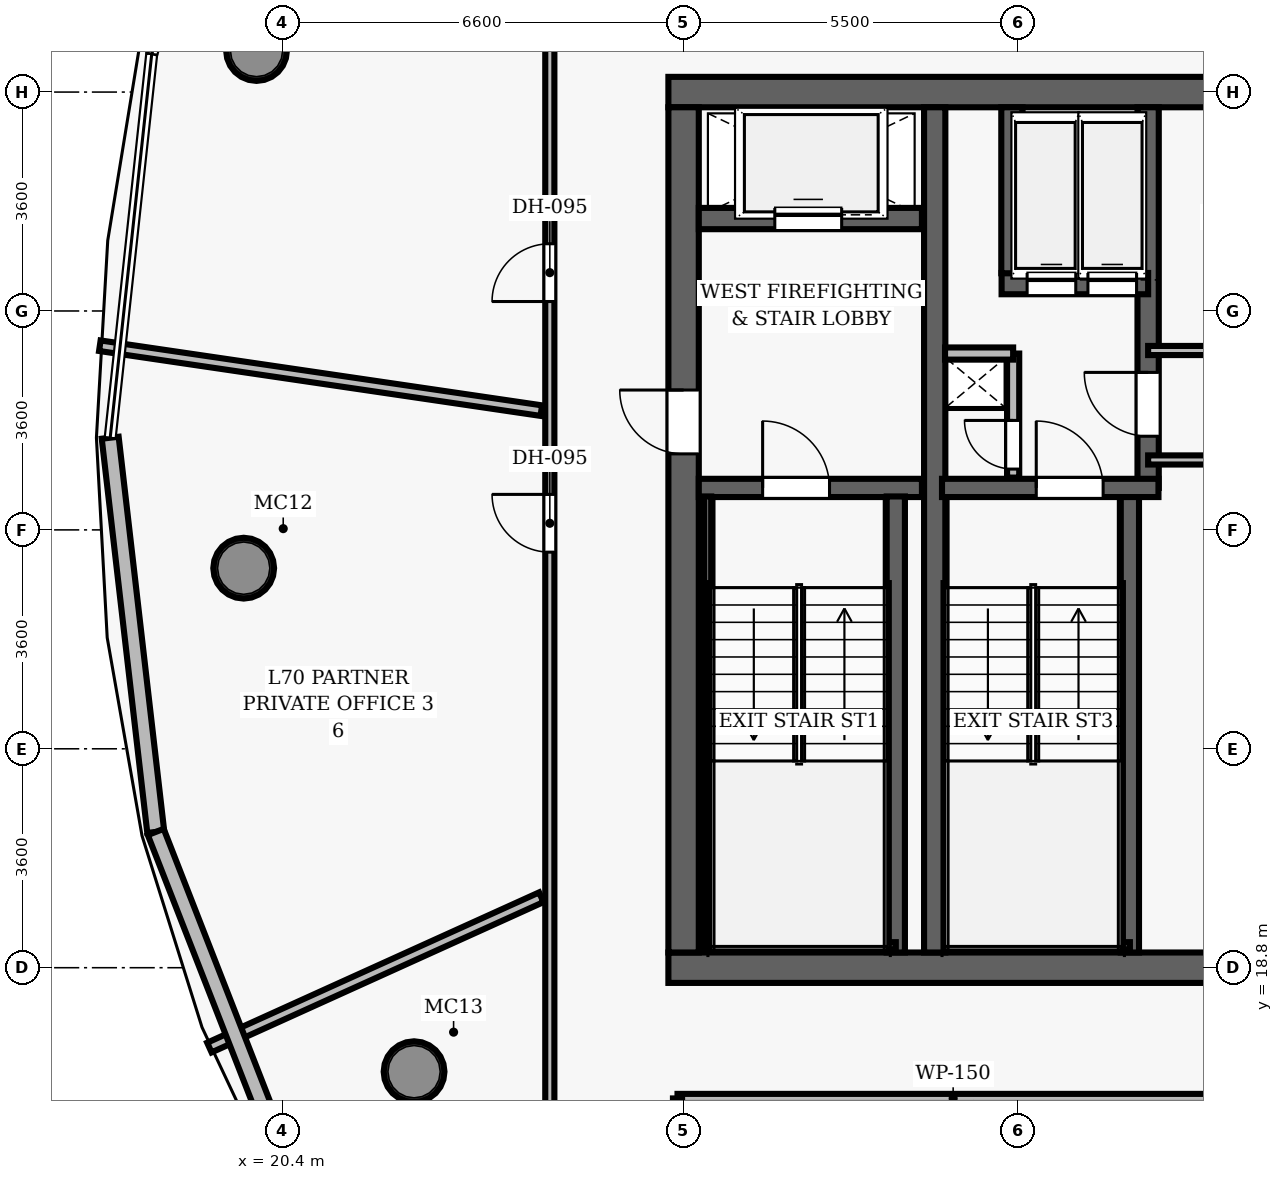
"""IFC4 building model, lengths in metres.
Left out: names, types, materials, properties, quantities, classifications, styles, units other than length and angle.
Written with IfcOpenShell. Run it as: python <this file> out.ifc"""

import sys

from ifc_helpers import new_model, si_unit, direction, frame, frame_2d, origin, origin_2d, place, context, subcontext, project, spatial, rectangle, hollow_circle, extrude, element, fill, save


model = new_model("IFC4")
c1 = context("Model", 3, precision=1e-05, world=origin(), true_north=direction((0.0, 1.0)))
c2 = subcontext(c1, "Body", "Model", "MODEL_VIEW")
j1 = project(units=[si_unit("LENGTHUNIT", "METRE"), si_unit("PLANEANGLEUNIT", "RADIAN")], contexts=[c1])
p1 = place(None, origin())
s1 = spatial("IfcSite", under=j1, at=p1, CompositionType="ELEMENT")
p2 = place(p1, origin())
s2 = spatial("IfcBuilding", under=s1, at=p2, CompositionType="ELEMENT")
p3 = place(p2, frame((0.0, 0.0, 276.7)))
s3 = spatial("IfcBuildingStorey", under=s2, at=p3, CompositionType="ELEMENT", Elevation=276.7)
p4 = place(p3, frame((26.75, 18.8, 0.0), z_axis=(0.0, 0.0, 1.0), x_axis=(1.0, 0.0, 0.0)))
e1 = element("IfcWall", 1, at=p4, inside=s3, PredefinedType="SHEAR", context=c2, shape_type="SweptSolid", body=[
    extrude(rectangle(XDim=22.5, YDim=0.5, at=frame_2d((11.25, 0.0))), origin(), (0.0, 0.0, 1.0), 3.85),
])
p5 = place(p4, frame((14.47, 0.0, 0.0)))
e2 = element("IfcOpeningElement", 2, at=p5, cuts=e1, PredefinedType="OPENING", context=c2, shape_type="SweptSolid", body=[
    extrude(rectangle(XDim=1.05, YDim=2.15, at=frame_2d((0.525, 1.075))), frame((0.0, 0.26, 0.0), z_axis=(0.0, -1.0, 0.0), x_axis=(1.0, 0.0, 0.0)), (0.0, 0.0, 1.0), 0.52),
])
p6 = place(p3, frame((26.75, 33.2, 0.0), z_axis=(0.0, 0.0, 1.0), x_axis=(1.0, 0.0, 0.0)))
e3 = element("IfcWall", 3, at=p6, inside=s3, PredefinedType="SHEAR", context=c2, shape_type="SweptSolid", body=[
    extrude(rectangle(XDim=22.5, YDim=0.5, at=frame_2d((11.25, 0.0))), origin(), (0.0, 0.0, 1.0), 3.85),
])
p7 = place(p3, frame((27.0, 19.05, 0.0), z_axis=(0.0, 0.0, 1.0), x_axis=(0.0, 1.0, 0.0)))
e4 = element("IfcWall", 4, at=p7, inside=s3, PredefinedType="SHEAR", context=c2, shape_type="SweptSolid", body=[
    extrude(rectangle(XDim=13.9, YDim=0.5, at=frame_2d((6.95, 0.0))), origin(), (0.0, 0.0, 1.0), 3.85),
])
p8 = place(p7, frame((8.2, 0.0, 0.0)))
e5 = element("IfcOpeningElement", 5, at=p8, cuts=e4, PredefinedType="OPENING", context=c2, shape_type="SweptSolid", body=[
    extrude(rectangle(XDim=1.05, YDim=2.15, at=frame_2d((0.525, 1.075))), frame((0.0, 0.26, 0.0), z_axis=(0.0, -1.0, 0.0), x_axis=(1.0, 0.0, 0.0)), (0.0, 0.0, 1.0), 0.52),
])
p9 = place(p3, frame((31.13, 19.05, 0.0), z_axis=(0.0, 0.0, 1.0), x_axis=(0.0, 1.0, 0.0)))
e6 = element("IfcWall", 6, at=p9, inside=s3, PredefinedType="SHEAR", context=c2, shape_type="SweptSolid", body=[
    extrude(rectangle(XDim=13.9, YDim=0.35, at=frame_2d((6.95, 0.0))), origin(), (0.0, 0.0, 1.0), 3.85),
])
for number, where, z_axis, x_axis in (
    (7, (19.976, 33.884, 0.0), (0.0, 0.0, 1.0), (1.0, 0.0, 0.0)),
    (8, (19.765, 25.371, 0.0), (0.0, 0.0, 1.0), (1.0, 0.0, 0.0)),
    (9, (22.567, 17.09, 0.0), (0.0, 0.0, 1.0), (1.0, 0.0, 0.0)),
):
    element("IfcColumn", number, at=place(p3, frame(where, z_axis=z_axis, x_axis=x_axis)), inside=s3, PredefinedType="COLUMN", context=c2, shape_type="SweptSolid", body=[
        extrude(hollow_circle(Radius=0.5, WallThickness=0.045, at=origin_2d()), origin(), (0.0, 0.0, 1.0), 3.85),
    ])
p10 = place(p3, frame((27.25, 26.69, 0.0), z_axis=(0.0, 0.0, 1.0), x_axis=(1.0, 0.0, 0.0)))
e10 = element("IfcWall", 10, at=p10, inside=s3, PredefinedType="SHEAR", context=c2, shape_type="SweptSolid", body=[
    extrude(rectangle(XDim=3.67, YDim=0.3, at=frame_2d((1.835, 0.0))), origin(), (0.0, 0.0, 1.0), 3.85),
])
p11 = place(p10, frame((1.05, 0.0, 0.0)))
e11 = element("IfcOpeningElement", 11, at=p11, cuts=e10, PredefinedType="OPENING", context=c2, shape_type="SweptSolid", body=[
    extrude(rectangle(XDim=1.1, YDim=2.15, at=frame_2d((0.55, 1.075))), frame((0.0, 0.16, 0.0), z_axis=(0.0, -1.0, 0.0), x_axis=(1.0, 0.0, 0.0)), (0.0, 0.0, 1.0), 0.32),
])
p12 = place(p3, frame((30.49, 19.05, 0.0), z_axis=(0.0, 0.0, 1.0), x_axis=(0.0, 1.0, 0.0)))
e12 = element("IfcWall", 12, at=p12, inside=s3, PredefinedType="SHEAR", context=c2, shape_type="SweptSolid", body=[
    extrude(rectangle(XDim=7.5, YDim=0.3, at=frame_2d((3.75, 0.0))), origin(), (0.0, 0.0, 1.0), 3.85),
])
p13 = place(p3, frame((27.395, 19.1, 0.0), z_axis=(0.0, 0.0, 1.0), x_axis=(0.0, 1.0, 0.0)))
e13 = element("IfcWall", 13, at=p13, inside=s3, PredefinedType="SHEAR", context=c2, shape_type="SweptSolid", body=[
    extrude(rectangle(XDim=7.45, YDim=0.12, at=frame_2d((3.725, 0.0))), origin(), (0.0, 0.0, 1.0), 3.85),
])
p14 = place(p3, frame((27.395, 19.16, 0.0), z_axis=(0.0, 0.0, 1.0), x_axis=(1.0, 0.0, 0.0)))
e14 = element("IfcWall", 14, at=p14, inside=s3, PredefinedType="SHEAR", context=c2, shape_type="SweptSolid", body=[
    extrude(rectangle(XDim=3.095, YDim=0.12, at=frame_2d((1.547, 0.0))), origin(), (0.0, 0.0, 1.0), 3.85),
])
p15 = place(p3, frame((27.25, 31.12, 0.0), z_axis=(0.0, 0.0, 1.0), x_axis=(1.0, 0.0, 0.0)))
e15 = element("IfcWall", 15, at=p15, inside=s3, PredefinedType="SHEAR", context=c2, shape_type="SweptSolid", body=[
    extrude(rectangle(XDim=3.67, YDim=0.35, at=frame_2d((1.835, 0.0))), origin(), (0.0, 0.0, 1.0), 3.04),
])
p16 = place(p15, frame((1.25, 0.0, 0.0)))
e16 = element("IfcOpeningElement", 16, at=p16, cuts=e15, PredefinedType="OPENING", context=c2, shape_type="SweptSolid", body=[
    extrude(rectangle(XDim=1.1, YDim=2.15, at=frame_2d((0.55, 1.075))), frame((0.0, 0.185, 0.0), z_axis=(0.0, -1.0, 0.0), x_axis=(1.0, 0.0, 0.0)), (0.0, 0.0, 1.0), 0.37),
])
p17 = place(p3, frame((34.34, 19.05, 0.0), z_axis=(0.0, 0.0, 1.0), x_axis=(0.0, 1.0, 0.0)))
e17 = element("IfcWall", 17, at=p17, inside=s3, PredefinedType="SHEAR", context=c2, shape_type="SweptSolid", body=[
    extrude(rectangle(XDim=7.5, YDim=0.3, at=frame_2d((3.75, 0.0))), origin(), (0.0, 0.0, 1.0), 3.85),
])
p18 = place(p3, frame((34.64, 26.69, 0.0), z_axis=(0.0, 0.0, 1.0), x_axis=(0.0, 1.0, 0.0)))
e18 = element("IfcWall", 18, at=p18, inside=s3, PredefinedType="SHEAR", context=c2, shape_type="SweptSolid", body=[
    extrude(rectangle(XDim=6.26, YDim=0.35, at=frame_2d((3.13, 0.0))), origin(), (0.0, 0.0, 1.0), 3.85),
])
p19 = place(p18, frame((0.85, 0.0, 0.0)))
e19 = element("IfcOpeningElement", 19, at=p19, cuts=e18, PredefinedType="OPENING", context=c2, shape_type="SweptSolid", body=[
    extrude(rectangle(XDim=1.05, YDim=2.15, at=frame_2d((0.525, 1.075))), frame((0.0, 0.185, 0.0), z_axis=(0.0, -1.0, 0.0), x_axis=(1.0, 0.0, 0.0)), (0.0, 0.0, 1.0), 0.37),
])
p20 = place(p3, frame((31.25, 26.69, 0.0), z_axis=(0.0, 0.0, 1.0), x_axis=(1.0, 0.0, 0.0)))
e20 = element("IfcWall", 20, at=p20, inside=s3, PredefinedType="SHEAR", context=c2, shape_type="SweptSolid", body=[
    extrude(rectangle(XDim=3.56, YDim=0.3, at=frame_2d((1.78, 0.0))), origin(), (0.0, 0.0, 1.0), 3.85),
])
p21 = place(p20, frame((1.55, 0.0, 0.0)))
e21 = element("IfcOpeningElement", 21, at=p21, cuts=e20, PredefinedType="OPENING", context=c2, shape_type="SweptSolid", body=[
    extrude(rectangle(XDim=1.1, YDim=2.15, at=frame_2d((0.55, 1.075))), frame((0.0, 0.16, 0.0), z_axis=(0.0, -1.0, 0.0), x_axis=(1.0, 0.0, 0.0)), (0.0, 0.0, 1.0), 0.32),
])
p22 = place(p3, frame((31.3, 19.16, 0.0), z_axis=(0.0, 0.0, 1.0), x_axis=(1.0, 0.0, 0.0)))
e22 = element("IfcWall", 22, at=p22, inside=s3, PredefinedType="SHEAR", context=c2, shape_type="SweptSolid", body=[
    extrude(rectangle(XDim=3.04, YDim=0.12, at=frame_2d((1.52, 0.0))), origin(), (0.0, 0.0, 1.0), 3.85),
])
p23 = place(p3, frame((32.23, 30.05, 0.0), z_axis=(0.0, 0.0, 1.0), x_axis=(1.0, 0.0, 0.0)))
e23 = element("IfcWall", 23, at=p23, inside=s3, PredefinedType="SHEAR", context=c2, shape_type="SweptSolid", body=[
    extrude(rectangle(XDim=2.41, YDim=0.35, at=frame_2d((1.205, 0.0))), origin(), (0.0, 0.0, 1.0), 3.04),
])
p24 = place(p23, frame((0.42, 0.0, 0.0)))
e24 = element("IfcOpeningElement", 24, at=p24, cuts=e23, PredefinedType="OPENING", context=c2, shape_type="SweptSolid", body=[
    extrude(rectangle(XDim=0.8, YDim=2.15, at=frame_2d((0.4, 1.075))), frame((0.0, 0.185, 0.0), z_axis=(0.0, -1.0, 0.0), x_axis=(1.0, 0.0, 0.0)), (0.0, 0.0, 1.0), 0.37),
])
p25 = place(p23, frame((1.42, 0.0, 0.0)))
e25 = element("IfcOpeningElement", 25, at=p25, cuts=e23, PredefinedType="OPENING", context=c2, shape_type="SweptSolid", body=[
    extrude(rectangle(XDim=0.8, YDim=2.15, at=frame_2d((0.4, 1.075))), frame((0.0, 0.185, 0.0), z_axis=(0.0, -1.0, 0.0), x_axis=(1.0, 0.0, 0.0)), (0.0, 0.0, 1.0), 0.37),
])
p26 = place(p3, frame((32.4, 30.22, 0.0), z_axis=(0.0, 0.0, 1.0), x_axis=(0.0, 1.0, 0.0)))
e26 = element("IfcWall", 26, at=p26, inside=s3, PredefinedType="SHEAR", context=c2, shape_type="SweptSolid", body=[
    extrude(rectangle(XDim=2.73, YDim=0.35, at=frame_2d((1.365, 0.0))), origin(), (0.0, 0.0, 1.0), 3.04),
])
p27 = place(p3, frame((32.42, 26.86, 0.0), z_axis=(0.0, 0.0, 1.0), x_axis=(0.0, 1.0, 0.0)))
e27 = element("IfcWall", 27, at=p27, inside=s3, PredefinedType="PARTITIONING", context=c2, shape_type="SweptSolid", body=[
    extrude(rectangle(XDim=2.04, YDim=0.2, at=frame_2d((1.02, 0.0))), origin(), (0.0, 0.0, 1.0), 3.04),
])
p28 = place(p27, frame((0.14, 0.0, 0.0)))
e28 = element("IfcOpeningElement", 28, at=p28, cuts=e27, PredefinedType="OPENING", context=c2, shape_type="SweptSolid", body=[
    extrude(rectangle(XDim=0.8, YDim=2.05, at=frame_2d((0.4, 1.025))), frame((0.0, 0.11, 0.0), z_axis=(0.0, -1.0, 0.0), x_axis=(1.0, 0.0, 0.0)), (0.0, 0.0, 1.0), 0.22),
])
p29 = place(p3, frame((31.3, 28.9, 0.0), z_axis=(0.0, 0.0, 1.0), x_axis=(1.0, 0.0, 0.0)))
e29 = element("IfcWall", 29, at=p29, inside=s3, PredefinedType="PARTITIONING", context=c2, shape_type="SweptSolid", body=[
    extrude(rectangle(XDim=1.12, YDim=0.2, at=frame_2d((0.56, 0.0))), origin(), (0.0, 0.0, 1.0), 3.04),
])
for number, where, z_axis, x_axis in (
    (30, (34.64, 27.15, 0.0), (0.0, 0.0, 1.0), (1.0, 0.0, 0.0)),
    (31, (34.64, 28.95, 0.0), (0.0, 0.0, 1.0), (1.0, 0.0, 0.0)),
):
    element("IfcWall", number, at=place(p3, frame(where, z_axis=z_axis, x_axis=x_axis)), inside=s3, PredefinedType="PARTITIONING", context=c2, shape_type="SweptSolid", body=[
        extrude(rectangle(XDim=6.36, YDim=0.15, at=frame_2d((3.18, 0.0))), origin(), (0.0, 0.0, 1.0), 3.04),
    ])
p30 = place(p3, frame((26.9, 16.65, 0.0), z_axis=(0.0, 0.0, 1.0), x_axis=(1.0, 0.0, 0.0)))
e32 = element("IfcWall", 32, at=p30, inside=s3, PredefinedType="PARTITIONING", context=c2, shape_type="SweptSolid", body=[
    extrude(rectangle(XDim=22.2, YDim=0.15, at=frame_2d((11.1, 0.0))), origin(), (0.0, 0.0, 1.0), 3.04),
])
p31 = place(p30, frame((9.217, 0.0, 0.0)))
e33 = element("IfcOpeningElement", 33, at=p31, cuts=e32, PredefinedType="OPENING", context=c2, shape_type="SweptSolid", body=[
    extrude(rectangle(XDim=0.95, YDim=2.15, at=frame_2d((0.475, 1.075))), frame((0.0, 0.085, 0.0), z_axis=(0.0, -1.0, 0.0), x_axis=(1.0, 0.0, 0.0)), (0.0, 0.0, 1.0), 0.17),
])
p32 = place(p30, frame((14.636, 0.0, 0.0)))
e34 = element("IfcOpeningElement", 34, at=p32, cuts=e32, PredefinedType="OPENING", context=c2, shape_type="SweptSolid", body=[
    extrude(rectangle(XDim=0.95, YDim=2.15, at=frame_2d((0.475, 1.075))), frame((0.0, 0.085, 0.0), z_axis=(0.0, -1.0, 0.0), x_axis=(1.0, 0.0, 0.0)), (0.0, 0.0, 1.0), 0.17),
])
p33 = place(p30, frame((18.246, 0.0, 0.0)))
e35 = element("IfcOpeningElement", 35, at=p33, cuts=e32, PredefinedType="OPENING", context=c2, shape_type="SweptSolid", body=[
    extrude(rectangle(XDim=0.95, YDim=2.15, at=frame_2d((0.475, 1.075))), frame((0.0, 0.085, 0.0), z_axis=(0.0, -1.0, 0.0), x_axis=(1.0, 0.0, 0.0)), (0.0, 0.0, 1.0), 0.17),
])
p34 = place(p3, frame((24.8, 10.6, 0.0), z_axis=(0.0, 0.0, 1.0), x_axis=(0.0, 1.0, 0.0)))
e36 = element("IfcWall", 36, at=p34, inside=s3, PredefinedType="PARTITIONING", context=c2, shape_type="SweptSolid", body=[
    extrude(rectangle(XDim=30.8, YDim=0.15, at=frame_2d((15.4, 0.0))), origin(), (0.0, 0.0, 1.0), 3.04),
])
p35 = place(p34, frame((19.156, 0.0, 0.0)))
e37 = element("IfcOpeningElement", 37, at=p35, cuts=e36, PredefinedType="OPENING", context=c2, shape_type="SweptSolid", body=[
    extrude(rectangle(XDim=0.95, YDim=2.15, at=frame_2d((0.475, 1.075))), frame((0.0, 0.085, 0.0), z_axis=(0.0, -1.0, 0.0), x_axis=(1.0, 0.0, 0.0)), (0.0, 0.0, 1.0), 0.17),
])
p36 = place(p34, frame((15.034, 0.0, 0.0)))
e38 = element("IfcOpeningElement", 38, at=p36, cuts=e36, PredefinedType="OPENING", context=c2, shape_type="SweptSolid", body=[
    extrude(rectangle(XDim=0.95, YDim=2.15, at=frame_2d((0.475, 1.075))), frame((0.0, 0.085, 0.0), z_axis=(0.0, -1.0, 0.0), x_axis=(1.0, 0.0, 0.0)), (0.0, 0.0, 1.0), 0.17),
])
p37 = place(p34, frame((1.941, 0.0, 0.0)))
e39 = element("IfcOpeningElement", 39, at=p37, cuts=e36, PredefinedType="OPENING", context=c2, shape_type="SweptSolid", body=[
    extrude(rectangle(XDim=0.95, YDim=2.15, at=frame_2d((0.475, 1.075))), frame((0.0, 0.085, 0.0), z_axis=(0.0, -1.0, 0.0), x_axis=(1.0, 0.0, 0.0)), (0.0, 0.0, 1.0), 0.17),
])
p38 = place(p3, frame((26.9, 10.6, 0.0), z_axis=(0.0, 0.0, 1.0), x_axis=(0.0, 1.0, 0.0)))
e40 = element("IfcWall", 40, at=p38, inside=s3, PredefinedType="PARTITIONING", context=c2, shape_type="SweptSolid", body=[
    extrude(rectangle(XDim=6.05, YDim=0.15, at=frame_2d((3.025, 0.0))), origin(), (0.0, 0.0, 1.0), 3.04),
])
p39 = place(p3, frame((24.66, 27.961, 0.0), z_axis=(0.0, 0.0, 1.0), x_axis=(-0.989360966301, 0.145481539582, 0.0)))
e41 = element("IfcWall", 41, at=p39, inside=s3, PredefinedType="PARTITIONING", context=c2, shape_type="SweptSolid", body=[
    extrude(rectangle(XDim=7.339, YDim=0.175, at=frame_2d((3.669, 0.0))), origin(), (0.0, 0.0, 1.0), 3.04),
])
p40 = place(p3, frame((24.66, 19.959, 0.0), z_axis=(0.0, 0.0, 1.0), x_axis=(-0.910943203607, -0.412531792474, 0.0)))
e42 = element("IfcWall", 42, at=p40, inside=s3, PredefinedType="PARTITIONING", context=c2, shape_type="SweptSolid", body=[
    extrude(rectangle(XDim=5.993, YDim=0.175, at=frame_2d((2.996, 0.0))), origin(), (0.0, 0.0, 1.0), 3.04),
])
p41 = place(p3, frame((18.319, 21.032, 0.0), z_axis=(0.0, 0.0, 1.0), x_axis=(-0.114811538643, 0.993387291339, 0.0)))
e43 = element("IfcWall", 43, at=p41, inside=s3, PredefinedType="SOLIDWALL", context=c2, shape_type="SweptSolid", body=[
    extrude(rectangle(XDim=6.526, YDim=0.28, at=frame_2d((3.263, 0.0))), origin(), (0.0, 0.0, 1.0), 3.625),
])
p42 = place(p3, frame((20.692, 14.952, 0.0), z_axis=(0.0, 0.0, 1.0), x_axis=(-0.363541693905, 0.931577928459, 0.0)))
e44 = element("IfcWall", 44, at=p42, inside=s3, PredefinedType="SOLIDWALL", context=c2, shape_type="SweptSolid", body=[
    extrude(rectangle(XDim=6.527, YDim=0.28, at=frame_2d((3.263, 0.0))), origin(), (0.0, 0.0, 1.0), 3.625),
])
p43 = place(p11, origin())
e45 = element("IfcDoor", 45, at=p43, inside=s3, OperationType="SINGLE_SWING_LEFT", PredefinedType="DOOR", context=c2, shape_type="SweptSolid", body=[
    extrude(rectangle(XDim=1.1, YDim=2.15, at=frame_2d((0.55, 1.075))), frame((0.0, 0.025, 0.0), z_axis=(0.0, -1.0, 0.0), x_axis=(1.0, 0.0, 0.0)), (0.0, 0.0, 1.0), 0.05),
])
fill(e11, e45)
p44 = place(p8, origin())
e46 = element("IfcDoor", 46, at=p44, inside=s3, OperationType="SINGLE_SWING_RIGHT", PredefinedType="DOOR", context=c2, shape_type="SweptSolid", body=[
    extrude(rectangle(XDim=1.05, YDim=2.15, at=frame_2d((0.525, 1.075))), frame((0.0, 0.025, 0.0), z_axis=(0.0, -1.0, 0.0), x_axis=(1.0, 0.0, 0.0)), (0.0, 0.0, 1.0), 0.05),
])
fill(e5, e46)
p45 = place(p21, origin())
e47 = element("IfcDoor", 47, at=p45, inside=s3, OperationType="SINGLE_SWING_LEFT", PredefinedType="DOOR", context=c2, shape_type="SweptSolid", body=[
    extrude(rectangle(XDim=1.1, YDim=2.15, at=frame_2d((0.55, 1.075))), frame((0.0, 0.025, 0.0), z_axis=(0.0, -1.0, 0.0), x_axis=(1.0, 0.0, 0.0)), (0.0, 0.0, 1.0), 0.05),
])
fill(e21, e47)
p46 = place(p28, origin())
e48 = element("IfcDoor", 48, at=p46, inside=s3, OperationType="SINGLE_SWING_RIGHT", PredefinedType="DOOR", context=c2, shape_type="SweptSolid", body=[
    extrude(rectangle(XDim=0.8, YDim=2.05, at=frame_2d((0.4, 1.025))), frame((0.0, 0.025, 0.0), z_axis=(0.0, -1.0, 0.0), x_axis=(1.0, 0.0, 0.0)), (0.0, 0.0, 1.0), 0.05),
])
fill(e28, e48)
p47 = place(p19, origin())
e49 = element("IfcDoor", 49, at=p47, inside=s3, OperationType="SINGLE_SWING_RIGHT", PredefinedType="DOOR", context=c2, shape_type="SweptSolid", body=[
    extrude(rectangle(XDim=1.05, YDim=2.15, at=frame_2d((0.525, 1.075))), frame((0.0, 0.025, 0.0), z_axis=(0.0, -1.0, 0.0), x_axis=(1.0, 0.0, 0.0)), (0.0, 0.0, 1.0), 0.05),
])
fill(e19, e49)
p48 = place(p35, origin())
e50 = element("IfcDoor", 50, at=p48, inside=s3, OperationType="SINGLE_SWING_LEFT", PredefinedType="DOOR", context=c2, shape_type="SweptSolid", body=[
    extrude(rectangle(XDim=0.95, YDim=2.15, at=frame_2d((0.475, 1.075))), frame((0.0, 0.025, 0.0), z_axis=(0.0, -1.0, 0.0), x_axis=(1.0, 0.0, 0.0)), (0.0, 0.0, 1.0), 0.05),
])
fill(e37, e50)
p49 = place(p36, origin())
e51 = element("IfcDoor", 51, at=p49, inside=s3, OperationType="SINGLE_SWING_RIGHT", PredefinedType="DOOR", context=c2, shape_type="SweptSolid", body=[
    extrude(rectangle(XDim=0.95, YDim=2.15, at=frame_2d((0.475, 1.075))), frame((0.0, 0.025, 0.0), z_axis=(0.0, -1.0, 0.0), x_axis=(1.0, 0.0, 0.0)), (0.0, 0.0, 1.0), 0.05),
])
fill(e38, e51)
p50 = place(p16, origin())
e52 = element("IfcDoor", 52, at=p50, inside=s3, OperationType="SLIDING_TO_LEFT", PredefinedType="DOOR", context=c2, shape_type="SweptSolid", body=[
    extrude(rectangle(XDim=1.1, YDim=2.15, at=frame_2d((0.55, 1.075))), frame((0.0, 0.025, 0.0), z_axis=(0.0, -1.0, 0.0), x_axis=(1.0, 0.0, 0.0)), (0.0, 0.0, 1.0), 0.05),
])
fill(e16, e52)
p51 = place(p24, origin())
e53 = element("IfcDoor", 53, at=p51, inside=s3, OperationType="SLIDING_TO_LEFT", PredefinedType="DOOR", context=c2, shape_type="SweptSolid", body=[
    extrude(rectangle(XDim=0.8, YDim=2.15, at=frame_2d((0.4, 1.075))), frame((0.0, 0.025, 0.0), z_axis=(0.0, -1.0, 0.0), x_axis=(1.0, 0.0, 0.0)), (0.0, 0.0, 1.0), 0.05),
])
fill(e24, e53)
p52 = place(p25, origin())
e54 = element("IfcDoor", 54, at=p52, inside=s3, OperationType="SLIDING_TO_LEFT", PredefinedType="DOOR", context=c2, shape_type="SweptSolid", body=[
    extrude(rectangle(XDim=0.8, YDim=2.15, at=frame_2d((0.4, 1.075))), frame((0.0, 0.025, 0.0), z_axis=(0.0, -1.0, 0.0), x_axis=(1.0, 0.0, 0.0)), (0.0, 0.0, 1.0), 0.05),
])
fill(e25, e54)
save(model, sys.argv[1])
